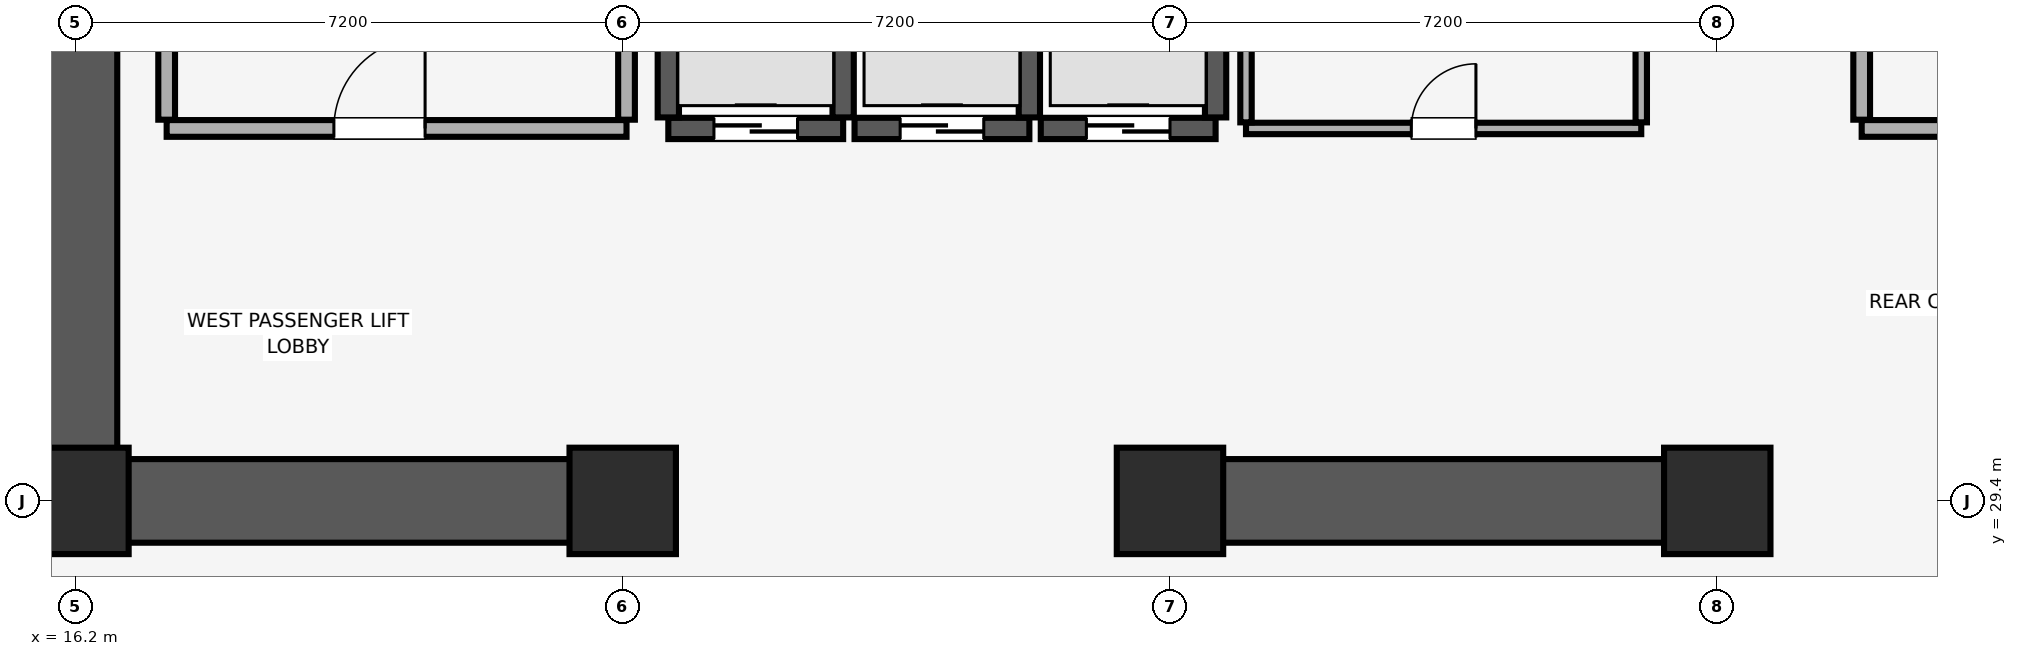
"""IFC4 building model, lengths in metres.
Left out: names, types, materials, properties, quantities, classifications, styles, units other than length and angle.
Written with IfcOpenShell. Run it as: python <this file> out.ifc"""

import sys

from ifc_helpers import new_model, si_unit, direction, frame, frame_2d, origin, origin_2d, place, context, subcontext, project, spatial, rectangle, extrude, element, fill, save


model = new_model("IFC4")
c1 = context("Model", 3, precision=1e-05, world=origin(), true_north=direction((0.0, 1.0)))
c2 = subcontext(c1, "Body", "Model", "MODEL_VIEW")
j1 = project(units=[si_unit("LENGTHUNIT", "METRE"), si_unit("PLANEANGLEUNIT", "RADIAN")], contexts=[c1])
p1 = place(None, origin())
s1 = spatial("IfcSite", under=j1, at=p1, CompositionType="ELEMENT")
p2 = place(p1, origin())
s2 = spatial("IfcBuilding", under=s1, at=p2, CompositionType="ELEMENT")
p3 = place(p2, frame((0.0, 0.0, 80.15)))
s3 = spatial("IfcBuildingStorey", under=s2, at=p3, CompositionType="ELEMENT", Elevation=80.15)
for number, where, z_axis, x_axis in (
    (1, (16.2, 29.4, 0.0), (0.0, 0.0, 1.0), (1.0, 0.0, 0.0)),
    (2, (23.4, 29.4, 0.0), (0.0, 0.0, 1.0), (1.0, 0.0, 0.0)),
    (3, (30.6, 29.4, 0.0), (0.0, 0.0, 1.0), (1.0, 0.0, 0.0)),
    (4, (37.8, 29.4, 0.0), (0.0, 0.0, 1.0), (1.0, 0.0, 0.0)),
):
    element("IfcColumn", number, at=place(p3, frame(where, z_axis=z_axis, x_axis=x_axis)), inside=s3, PredefinedType="COLUMN", context=c2, shape_type="SweptSolid", body=[
        extrude(rectangle(XDim=1.4, YDim=1.4, at=origin_2d()), origin(), (0.0, 0.0, 1.0), 5.16),
    ])
p4 = place(p3, frame((16.2, 29.4, 0.0), z_axis=(0.0, 0.0, 1.0), x_axis=(0.0, 1.0, 0.0)))
e5 = element("IfcWall", 5, at=p4, inside=s3, PredefinedType="SHEAR", context=c2, shape_type="SweptSolid", body=[
    extrude(rectangle(XDim=19.2, YDim=1.1, at=frame_2d((9.6, 0.0))), origin(), (0.0, 0.0, 1.0), 5.16),
])
p5 = place(p3, frame((16.755, 29.4, 0.0), z_axis=(0.0, 0.0, 1.0), x_axis=(1.0, 0.0, 0.0)))
e6 = element("IfcWall", 6, at=p5, inside=s3, PredefinedType="SHEAR", context=c2, shape_type="SweptSolid", body=[
    extrude(rectangle(XDim=6.845, YDim=1.1, at=frame_2d((3.423, 0.0))), origin(), (0.0, 0.0, 1.0), 5.16),
])
p6 = place(p3, frame((30.4, 29.4, 0.0), z_axis=(0.0, 0.0, 1.0), x_axis=(1.0, 0.0, 0.0)))
e7 = element("IfcWall", 7, at=p6, inside=s3, PredefinedType="SHEAR", context=c2, shape_type="SweptSolid", body=[
    extrude(rectangle(XDim=7.6, YDim=1.1, at=frame_2d((3.8, 0.0))), origin(), (0.0, 0.0, 1.0), 5.16),
])
p7 = place(p3, frame((24.0, 34.3, 0.0), z_axis=(0.0, 0.0, 1.0), x_axis=(1.0, 0.0, 0.0)))
e8 = element("IfcWall", 8, at=p7, inside=s3, PredefinedType="SHEAR", context=c2, shape_type="SweptSolid", body=[
    extrude(rectangle(XDim=2.3, YDim=0.28, at=frame_2d((1.15, 0.0))), origin(), (0.0, 0.0, 1.0), 5.16),
])
p8 = place(p7, frame((0.6, 0.0, 0.0)))
e9 = element("IfcOpeningElement", 9, at=p8, cuts=e8, PredefinedType="OPENING", context=c2, shape_type="SweptSolid", body=[
    extrude(rectangle(XDim=1.1, YDim=2.2, at=frame_2d((0.55, 1.1))), frame((0.0, 0.15, 0.0), z_axis=(0.0, -1.0, 0.0), x_axis=(1.0, 0.0, 0.0)), (0.0, 0.0, 1.0), 0.3),
])
for number, where, z_axis, x_axis in (
    (10, (24.0, 34.445, 0.0), (0.0, 0.0, 1.0), (0.0, 1.0, 0.0)),
    (11, (26.3, 34.445, 0.0), (0.0, 0.0, 1.0), (0.0, 1.0, 0.0)),
):
    element("IfcWall", number, at=place(p3, frame(where, z_axis=z_axis, x_axis=x_axis)), inside=s3, PredefinedType="SHEAR", context=c2, shape_type="SweptSolid", body=[
        extrude(rectangle(XDim=2.01, YDim=0.28, at=frame_2d((1.005, 0.0))), origin(), (0.0, 0.0, 1.0), 5.16),
    ])
p9 = place(p3, frame((26.45, 34.3, 0.0), z_axis=(0.0, 0.0, 1.0), x_axis=(1.0, 0.0, 0.0)))
e12 = element("IfcWall", 12, at=p9, inside=s3, PredefinedType="SHEAR", context=c2, shape_type="SweptSolid", body=[
    extrude(rectangle(XDim=2.3, YDim=0.28, at=frame_2d((1.15, 0.0))), origin(), (0.0, 0.0, 1.0), 5.16),
])
p10 = place(p9, frame((0.6, 0.0, 0.0)))
e13 = element("IfcOpeningElement", 13, at=p10, cuts=e12, PredefinedType="OPENING", context=c2, shape_type="SweptSolid", body=[
    extrude(rectangle(XDim=1.1, YDim=2.2, at=frame_2d((0.55, 1.1))), frame((0.0, 0.15, 0.0), z_axis=(0.0, -1.0, 0.0), x_axis=(1.0, 0.0, 0.0)), (0.0, 0.0, 1.0), 0.3),
])
p11 = place(p3, frame((28.75, 34.445, 0.0), z_axis=(0.0, 0.0, 1.0), x_axis=(0.0, 1.0, 0.0)))
e14 = element("IfcWall", 14, at=p11, inside=s3, PredefinedType="SHEAR", context=c2, shape_type="SweptSolid", body=[
    extrude(rectangle(XDim=2.01, YDim=0.28, at=frame_2d((1.005, 0.0))), origin(), (0.0, 0.0, 1.0), 5.16),
])
p12 = place(p3, frame((28.9, 34.3, 0.0), z_axis=(0.0, 0.0, 1.0), x_axis=(1.0, 0.0, 0.0)))
e15 = element("IfcWall", 15, at=p12, inside=s3, PredefinedType="SHEAR", context=c2, shape_type="SweptSolid", body=[
    extrude(rectangle(XDim=2.3, YDim=0.28, at=frame_2d((1.15, 0.0))), origin(), (0.0, 0.0, 1.0), 5.16),
])
p13 = place(p12, frame((0.6, 0.0, 0.0)))
e16 = element("IfcOpeningElement", 16, at=p13, cuts=e15, PredefinedType="OPENING", context=c2, shape_type="SweptSolid", body=[
    extrude(rectangle(XDim=1.1, YDim=2.2, at=frame_2d((0.55, 1.1))), frame((0.0, 0.15, 0.0), z_axis=(0.0, -1.0, 0.0), x_axis=(1.0, 0.0, 0.0)), (0.0, 0.0, 1.0), 0.3),
])
p14 = place(p3, frame((31.2, 34.445, 0.0), z_axis=(0.0, 0.0, 1.0), x_axis=(0.0, 1.0, 0.0)))
e17 = element("IfcWall", 17, at=p14, inside=s3, PredefinedType="SHEAR", context=c2, shape_type="SweptSolid", body=[
    extrude(rectangle(XDim=2.01, YDim=0.28, at=frame_2d((1.005, 0.0))), origin(), (0.0, 0.0, 1.0), 5.16),
])
p15 = place(p3, frame((17.4, 34.3, 0.0), z_axis=(0.0, 0.0, 1.0), x_axis=(1.0, 0.0, 0.0)))
e18 = element("IfcWall", 18, at=p15, inside=s3, PredefinedType="PARTITIONING", context=c2, shape_type="SweptSolid", body=[
    extrude(rectangle(XDim=6.05, YDim=0.22, at=frame_2d((3.025, 0.0))), origin(), (0.0, 0.0, 1.0), 5.16),
])
p16 = place(p15, frame((2.2, 0.0, 0.0)))
e19 = element("IfcOpeningElement", 19, at=p16, cuts=e18, PredefinedType="OPENING", context=c2, shape_type="SweptSolid", body=[
    extrude(rectangle(XDim=1.2, YDim=2.15, at=frame_2d((0.6, 1.075))), frame((0.0, 0.12, 0.0), z_axis=(0.0, -1.0, 0.0), x_axis=(1.0, 0.0, 0.0)), (0.0, 0.0, 1.0), 0.24),
])
p17 = place(p3, frame((17.4, 34.415, 0.0), z_axis=(0.0, 0.0, 1.0), x_axis=(0.0, 1.0, 0.0)))
e20 = element("IfcWall", 20, at=p17, inside=s3, PredefinedType="PARTITIONING", context=c2, shape_type="SweptSolid", body=[
    extrude(rectangle(XDim=5.43, YDim=0.22, at=frame_2d((2.715, 0.0))), origin(), (0.0, 0.0, 1.0), 5.16),
])
p18 = place(p3, frame((23.45, 34.415, 0.0), z_axis=(0.0, 0.0, 1.0), x_axis=(0.0, 1.0, 0.0)))
e21 = element("IfcWall", 21, at=p18, inside=s3, PredefinedType="PARTITIONING", context=c2, shape_type="SweptSolid", body=[
    extrude(rectangle(XDim=5.64, YDim=0.22, at=frame_2d((2.82, 0.0))), origin(), (0.0, 0.0, 1.0), 5.16),
])
p19 = place(p3, frame((39.7, 34.3, 0.0), z_axis=(0.0, 0.0, 1.0), x_axis=(1.0, 0.0, 0.0)))
e22 = element("IfcWall", 22, at=p19, inside=s3, PredefinedType="PARTITIONING", context=c2, shape_type="SweptSolid", body=[
    extrude(rectangle(XDim=4.6, YDim=0.22, at=frame_2d((2.3, 0.0))), origin(), (0.0, 0.0, 1.0), 5.16),
])
p20 = place(p19, frame((1.7, 0.0, 0.0)))
e23 = element("IfcOpeningElement", 23, at=p20, cuts=e22, PredefinedType="OPENING", context=c2, shape_type="SweptSolid", body=[
    extrude(rectangle(XDim=1.2, YDim=2.15, at=frame_2d((0.6, 1.075))), frame((0.0, 0.12, 0.0), z_axis=(0.0, -1.0, 0.0), x_axis=(1.0, 0.0, 0.0)), (0.0, 0.0, 1.0), 0.24),
])
p21 = place(p3, frame((39.7, 34.415, 0.0), z_axis=(0.0, 0.0, 1.0), x_axis=(0.0, 1.0, 0.0)))
e24 = element("IfcWall", 24, at=p21, inside=s3, PredefinedType="PARTITIONING", context=c2, shape_type="SweptSolid", body=[
    extrude(rectangle(XDim=5.785, YDim=0.22, at=frame_2d((2.893, 0.0))), origin(), (0.0, 0.0, 1.0), 5.16),
])
p22 = place(p3, frame((31.6, 34.3, 0.0), z_axis=(0.0, 0.0, 1.0), x_axis=(1.0, 0.0, 0.0)))
e25 = element("IfcWall", 25, at=p22, inside=s3, PredefinedType="PARTITIONING", context=c2, shape_type="SweptSolid", body=[
    extrude(rectangle(XDim=5.2, YDim=0.15, at=frame_2d((2.6, 0.0))), origin(), (0.0, 0.0, 1.0), 5.16),
])
p23 = place(p22, frame((2.175, 0.0, 0.0)))
e26 = element("IfcOpeningElement", 26, at=p23, cuts=e25, PredefinedType="OPENING", context=c2, shape_type="SweptSolid", body=[
    extrude(rectangle(XDim=0.85, YDim=2.1, at=frame_2d((0.425, 1.05))), frame((0.0, 0.085, 0.0), z_axis=(0.0, -1.0, 0.0), x_axis=(1.0, 0.0, 0.0)), (0.0, 0.0, 1.0), 0.17),
])
for number, where, z_axis, x_axis in (
    (27, (31.6, 34.38, 0.0), (0.0, 0.0, 1.0), (0.0, 1.0, 0.0)),
    (28, (36.8, 34.38, 0.0), (0.0, 0.0, 1.0), (0.0, 1.0, 0.0)),
):
    element("IfcWall", number, at=place(p3, frame(where, z_axis=z_axis, x_axis=x_axis)), inside=s3, PredefinedType="PARTITIONING", context=c2, shape_type="SweptSolid", body=[
        extrude(rectangle(XDim=4.94, YDim=0.15, at=frame_2d((2.47, 0.0))), origin(), (0.0, 0.0, 1.0), 5.16),
    ])
p24 = place(p8, origin())
e29 = element("IfcDoor", 29, at=p24, inside=s3, OperationType="DOUBLE_DOOR_SLIDING", PredefinedType="DOOR", context=c2, shape_type="SweptSolid", body=[
    extrude(rectangle(XDim=1.1, YDim=2.2, at=frame_2d((0.55, 1.1))), frame((0.0, 0.025, 0.0), z_axis=(0.0, -1.0, 0.0), x_axis=(1.0, 0.0, 0.0)), (0.0, 0.0, 1.0), 0.05),
])
fill(e9, e29)
p25 = place(p10, origin())
e30 = element("IfcDoor", 30, at=p25, inside=s3, OperationType="DOUBLE_DOOR_SLIDING", PredefinedType="DOOR", context=c2, shape_type="SweptSolid", body=[
    extrude(rectangle(XDim=1.1, YDim=2.2, at=frame_2d((0.55, 1.1))), frame((0.0, 0.025, 0.0), z_axis=(0.0, -1.0, 0.0), x_axis=(1.0, 0.0, 0.0)), (0.0, 0.0, 1.0), 0.05),
])
fill(e13, e30)
p26 = place(p13, origin())
e31 = element("IfcDoor", 31, at=p26, inside=s3, OperationType="DOUBLE_DOOR_SLIDING", PredefinedType="DOOR", context=c2, shape_type="SweptSolid", body=[
    extrude(rectangle(XDim=1.1, YDim=2.2, at=frame_2d((0.55, 1.1))), frame((0.0, 0.025, 0.0), z_axis=(0.0, -1.0, 0.0), x_axis=(1.0, 0.0, 0.0)), (0.0, 0.0, 1.0), 0.05),
])
fill(e16, e31)
p27 = place(p16, origin())
e32 = element("IfcDoor", 32, at=p27, inside=s3, OperationType="SINGLE_SWING_RIGHT", PredefinedType="DOOR", context=c2, shape_type="SweptSolid", body=[
    extrude(rectangle(XDim=1.2, YDim=2.15, at=frame_2d((0.6, 1.075))), frame((0.0, 0.025, 0.0), z_axis=(0.0, -1.0, 0.0), x_axis=(1.0, 0.0, 0.0)), (0.0, 0.0, 1.0), 0.05),
])
fill(e19, e32)
p28 = place(p23, origin())
e33 = element("IfcDoor", 33, at=p28, inside=s3, OperationType="SINGLE_SWING_RIGHT", PredefinedType="DOOR", context=c2, shape_type="SweptSolid", body=[
    extrude(rectangle(XDim=0.85, YDim=2.1, at=frame_2d((0.425, 1.05))), frame((0.0, 0.025, 0.0), z_axis=(0.0, -1.0, 0.0), x_axis=(1.0, 0.0, 0.0)), (0.0, 0.0, 1.0), 0.05),
])
fill(e26, e33)
save(model, sys.argv[1])
